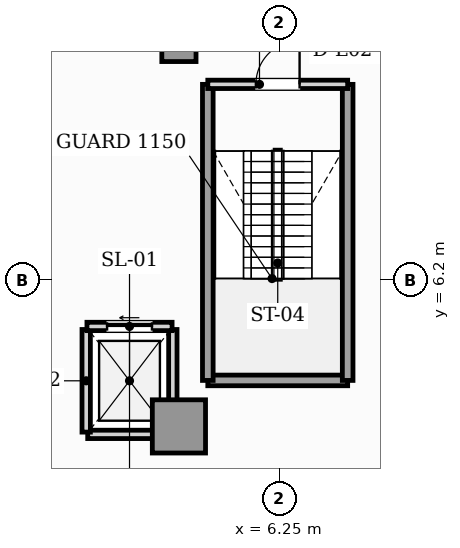
"""IFC4 building model, lengths in metres.
Left out: names, types, materials, properties, quantities, classifications, styles, units other than length and angle.
Written with IfcOpenShell. Run it as: python <this file> out.ifc"""

import sys

from ifc_helpers import new_model, si_unit, direction, frame, frame_2d, origin, origin_2d, place, context, subcontext, project, spatial, rectangle, hollow_rectangle, extrude, element, fill, save


model = new_model("IFC4")
c1 = context("Model", 3, precision=1e-05, world=origin(), true_north=direction((0.0, 1.0)))
c2 = subcontext(c1, "Body", "Model", "MODEL_VIEW")
j1 = project(units=[si_unit("LENGTHUNIT", "METRE"), si_unit("PLANEANGLEUNIT", "RADIAN")], contexts=[c1])
p1 = place(None, origin())
s1 = spatial("IfcSite", under=j1, at=p1, CompositionType="ELEMENT")
p2 = place(p1, origin())
s2 = spatial("IfcBuilding", under=s1, at=p2, CompositionType="ELEMENT")
p3 = place(p2, frame((0.0, 0.0, 10.2)))
s3 = spatial("IfcBuildingStorey", under=s2, at=p3, CompositionType="ELEMENT", Elevation=10.2)
p4 = place(p3, frame((3.6, 2.35, 0.0), z_axis=(0.0, 0.0, 1.0), x_axis=(1.0, 0.0, 0.0)))
e1 = element("IfcColumn", 1, at=p4, inside=s3, PredefinedType="USERDEFINED", context=c2, shape_type="SweptSolid", body=[
    extrude(hollow_rectangle(XDim=1.4, YDim=1.4, WallThickness=0.08, at=origin_2d()), origin(), (0.0, 0.0, 1.0), 4.8),
])
p5 = place(p3, frame((3.6, 12.4, 0.0), z_axis=(0.0, 0.0, 1.0), x_axis=(1.0, 0.0, 0.0)))
e2 = element("IfcColumn", 2, at=p5, inside=s3, PredefinedType="COLUMN", context=c2, shape_type="SweptSolid", body=[
    extrude(rectangle(XDim=0.9, YDim=0.9, at=origin_2d()), origin(), (0.0, 0.0, 1.0), 4.8),
])
p6 = place(p3, frame((1.2, 2.14, 0.0), z_axis=(0.0, 0.0, 1.0), x_axis=(1.0, 0.0, 0.0)))
e3 = element("IfcWall", 3, at=p6, inside=s3, PredefinedType="SOLIDWALL", context=c2, shape_type="SweptSolid", body=[
    extrude(rectangle(XDim=2.2, YDim=0.22, at=frame_2d((1.1, 0.0))), origin(), (0.0, 0.0, 1.0), 4.52),
])
p7 = place(p3, frame((1.16, 2.2, 0.0), z_axis=(0.0, 0.0, 1.0), x_axis=(0.0, 1.0, 0.0)))
e4 = element("IfcWall", 4, at=p7, inside=s3, PredefinedType="SOLIDWALL", context=c2, shape_type="SweptSolid", body=[
    extrude(rectangle(XDim=2.7, YDim=0.22, at=frame_2d((1.35, 0.0))), origin(), (0.0, 0.0, 1.0), 4.52),
])
p8 = place(p3, frame((3.44, 2.2, 0.0), z_axis=(0.0, 0.0, 1.0), x_axis=(0.0, 1.0, 0.0)))
e5 = element("IfcWall", 5, at=p8, inside=s3, PredefinedType="SOLIDWALL", context=c2, shape_type="SweptSolid", body=[
    extrude(rectangle(XDim=2.7, YDim=0.22, at=frame_2d((1.35, 0.0))), origin(), (0.0, 0.0, 1.0), 3.987),
])
p9 = place(p3, frame((1.18, 4.98, 0.0), z_axis=(0.0, 0.0, 1.0), x_axis=(1.0, 0.0, 0.0)))
e6 = element("IfcWall", 6, at=p9, inside=s3, PredefinedType="SOLIDWALL", context=c2, shape_type="SweptSolid", body=[
    extrude(rectangle(XDim=2.24, YDim=0.22, at=frame_2d((1.12, 0.0))), origin(), (0.0, 0.0, 1.0), 4.52),
])
p10 = place(p9, frame((0.53, 0.0, 0.0)))
e7 = element("IfcOpeningElement", 7, at=p10, cuts=e6, PredefinedType="OPENING", context=c2, shape_type="SweptSolid", body=[
    extrude(rectangle(XDim=1.18, YDim=2.2, at=frame_2d((0.59, 1.1))), frame((0.0, 0.12, 0.0), z_axis=(0.0, -1.0, 0.0), x_axis=(1.0, 0.0, 0.0)), (0.0, 0.0, 1.0), 0.24),
])
p11 = place(p3, frame((4.36, 3.56, 0.0), z_axis=(0.0, 0.0, 1.0), x_axis=(1.0, 0.0, 0.0)))
e8 = element("IfcWall", 8, at=p11, inside=s3, PredefinedType="SHEAR", context=c2, shape_type="SweptSolid", body=[
    extrude(rectangle(XDim=3.68, YDim=0.28, at=frame_2d((1.84, 0.0))), origin(), (0.0, 0.0, 1.0), 4.52),
])
for number, where, z_axis, x_axis in (
    (9, (4.36, 3.56, 0.0), (0.0, 0.0, 1.0), (0.0, 1.0, 0.0)),
    (10, (8.04, 3.56, 0.0), (0.0, 0.0, 1.0), (0.0, 1.0, 0.0)),
):
    element("IfcWall", number, at=place(p3, frame(where, z_axis=z_axis, x_axis=x_axis)), inside=s3, PredefinedType="SHEAR", context=c2, shape_type="SweptSolid", body=[
        extrude(rectangle(XDim=7.79, YDim=0.28, at=frame_2d((3.895, 0.0))), origin(), (0.0, 0.0, 1.0), 4.52),
    ])
p12 = place(p3, frame((4.36, 11.35, 0.0), z_axis=(0.0, 0.0, 1.0), x_axis=(1.0, 0.0, 0.0)))
e11 = element("IfcWall", 11, at=p12, inside=s3, PredefinedType="SOLIDWALL", context=c2, shape_type="SweptSolid", body=[
    extrude(rectangle(XDim=3.68, YDim=0.22, at=frame_2d((1.84, 0.0))), origin(), (0.0, 0.0, 1.0), 4.52),
])
p13 = place(p12, frame((1.265, 0.0, 0.0)))
e12 = element("IfcOpeningElement", 12, at=p13, cuts=e11, PredefinedType="OPENING", context=c2, shape_type="SweptSolid", body=[
    extrude(rectangle(XDim=1.15, YDim=2.2, at=frame_2d((0.575, 1.1))), frame((0.0, 0.12, 0.0), z_axis=(0.0, -1.0, 0.0), x_axis=(1.0, 0.0, 0.0)), (0.0, 0.0, 1.0), 0.24),
])
p14 = place(p10, origin())
e13 = element("IfcDoor", 13, at=p14, inside=s3, OperationType="SLIDING_TO_LEFT", PredefinedType="DOOR", context=c2, shape_type="SweptSolid", body=[
    extrude(rectangle(XDim=1.18, YDim=2.2, at=frame_2d((0.59, 1.1))), frame((0.0, 0.025, 0.0), z_axis=(0.0, -1.0, 0.0), x_axis=(1.0, 0.0, 0.0)), (0.0, 0.0, 1.0), 0.05),
])
fill(e7, e13)
p15 = place(p13, origin())
e14 = element("IfcDoor", 14, at=p15, inside=s3, OperationType="SINGLE_SWING_RIGHT", PredefinedType="DOOR", context=c2, shape_type="SweptSolid", body=[
    extrude(rectangle(XDim=1.15, YDim=2.2, at=frame_2d((0.575, 1.1))), frame((0.0, 0.025, 0.0), z_axis=(0.0, -1.0, 0.0), x_axis=(1.0, 0.0, 0.0)), (0.0, 0.0, 1.0), 0.05),
])
fill(e12, e14)
save(model, sys.argv[1])
